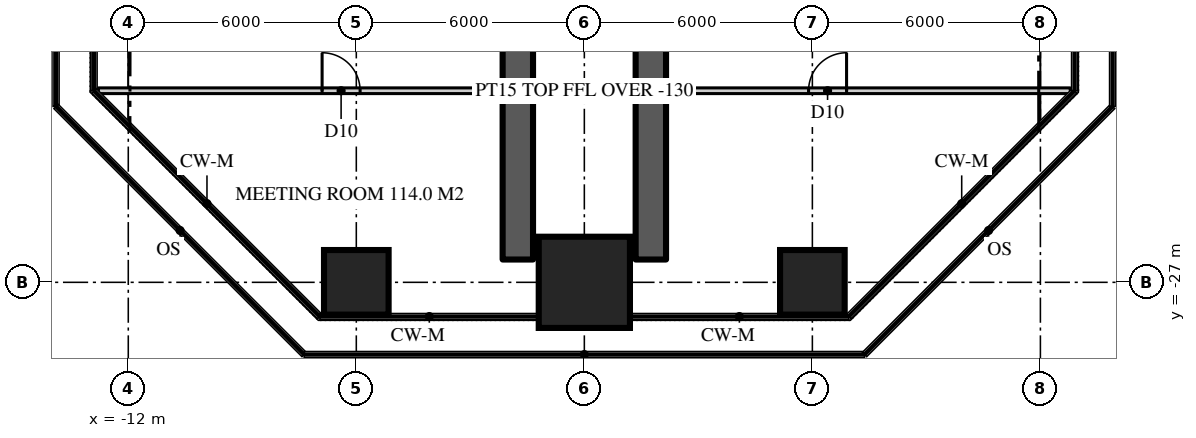
"""IFC4 building model, lengths in metres.
Left out: names, types, materials, properties, quantities, classifications, styles, units other than length and angle.
Written with IfcOpenShell. Run it as: python <this file> out.ifc"""

import sys

from ifc_helpers import new_model, si_unit, direction, frame, frame_2d, origin, origin_2d, place, context, subcontext, project, spatial, rectangle, extrude, element, fill, save


model = new_model("IFC4")
c1 = context("Model", 3, precision=1e-05, world=origin(), true_north=direction((0.0, 1.0)))
c2 = subcontext(c1, "Body", "Model", "MODEL_VIEW")
j1 = project(units=[si_unit("LENGTHUNIT", "METRE"), si_unit("PLANEANGLEUNIT", "RADIAN")], contexts=[c1])
p1 = place(None, origin())
s1 = spatial("IfcSite", under=j1, at=p1, CompositionType="ELEMENT")
p2 = place(p1, origin())
s2 = spatial("IfcBuilding", under=s1, at=p2, CompositionType="ELEMENT")
p3 = place(p2, frame((0.0, 0.0, 190.5)))
s3 = spatial("IfcBuildingStorey", under=s2, at=p3, CompositionType="ELEMENT", Elevation=190.5)
for number, where, z_axis, x_axis in (
    (1, (-1.75, -11.15, 0.0), (0.0, 0.0, 1.0), (0.0, -1.0, 0.0)),
    (2, (1.75, -11.15, 0.0), (0.0, 0.0, 1.0), (0.0, -1.0, 0.0)),
):
    element("IfcWall", number, at=place(p3, frame(where, z_axis=z_axis, x_axis=x_axis)), inside=s3, PredefinedType="SHEAR", context=c2, shape_type="SweptSolid", body=[
        extrude(rectangle(XDim=15.25, YDim=0.8, at=frame_2d((7.625, 0.0))), origin(), (0.0, 0.0, 1.0), 3.9),
    ])
p4 = place(p3, frame((-6.0, -27.0, 0.0), z_axis=(0.0, 0.0, 1.0), x_axis=(1.0, 0.0, 0.0)))
e3 = element("IfcColumn", 3, at=p4, inside=s3, PredefinedType="COLUMN", context=c2, shape_type="SweptSolid", body=[
    extrude(rectangle(XDim=1.7, YDim=1.7, at=origin_2d()), origin(), (0.0, 0.0, 1.0), 3.9),
])
p5 = place(p3, frame((0.0, -27.0, 0.0), z_axis=(0.0, 0.0, 1.0), x_axis=(1.0, 0.0, 0.0)))
e4 = element("IfcColumn", 4, at=p5, inside=s3, PredefinedType="COLUMN", context=c2, shape_type="SweptSolid", body=[
    extrude(rectangle(XDim=2.4, YDim=2.4, at=origin_2d()), origin(), (0.0, 0.0, 1.0), 3.9),
])
p6 = place(p3, frame((6.0, -27.0, 0.0), z_axis=(0.0, 0.0, 1.0), x_axis=(1.0, 0.0, 0.0)))
e5 = element("IfcColumn", 5, at=p6, inside=s3, PredefinedType="COLUMN", context=c2, shape_type="SweptSolid", body=[
    extrude(rectangle(XDim=1.7, YDim=1.7, at=origin_2d()), origin(), (0.0, 0.0, 1.0), 3.9),
])
p7 = place(p3, frame((-12.786, -21.959, 0.0), z_axis=(0.0, 0.0, 1.0), x_axis=(1.0, 0.0, 0.0)))
e6 = element("IfcWall", 6, at=p7, inside=s3, PredefinedType="PARTITIONING", context=c2, shape_type="SweptSolid", body=[
    extrude(rectangle(XDim=25.573, YDim=0.15, at=frame_2d((12.786, 0.0))), origin(), (0.0, 0.0, 1.0), 3.77),
])
p8 = place(p7, frame((18.687, 0.0, 0.0)))
e7 = element("IfcOpeningElement", 7, at=p8, cuts=e6, PredefinedType="OPENING", context=c2, shape_type="SweptSolid", body=[
    extrude(rectangle(XDim=1.0, YDim=2.2, at=frame_2d((0.5, 1.1))), frame((0.0, 0.085, 0.0), z_axis=(0.0, -1.0, 0.0), x_axis=(1.0, 0.0, 0.0)), (0.0, 0.0, 1.0), 0.17),
])
p9 = place(p7, frame((5.886, 0.0, 0.0)))
e8 = element("IfcOpeningElement", 8, at=p9, cuts=e6, PredefinedType="OPENING", context=c2, shape_type="SweptSolid", body=[
    extrude(rectangle(XDim=1.0, YDim=2.2, at=frame_2d((0.5, 1.1))), frame((0.0, 0.085, 0.0), z_axis=(0.0, -1.0, 0.0), x_axis=(1.0, 0.0, 0.0)), (0.0, 0.0, 1.0), 0.17),
])
p10 = place(p8, origin())
e9 = element("IfcDoor", 9, at=p10, inside=s3, OperationType="SINGLE_SWING_RIGHT", PredefinedType="DOOR", context=c2, shape_type="SweptSolid", body=[
    extrude(rectangle(XDim=1.0, YDim=2.2, at=frame_2d((0.5, 1.1))), frame((0.0, 0.025, 0.0), z_axis=(0.0, -1.0, 0.0), x_axis=(1.0, 0.0, 0.0)), (0.0, 0.0, 1.0), 0.05),
])
fill(e7, e9)
p11 = place(p9, origin())
e10 = element("IfcDoor", 10, at=p11, inside=s3, OperationType="SINGLE_SWING_LEFT", PredefinedType="DOOR", context=c2, shape_type="SweptSolid", body=[
    extrude(rectangle(XDim=1.0, YDim=2.2, at=frame_2d((0.5, 1.1))), frame((0.0, 0.025, 0.0), z_axis=(0.0, -1.0, 0.0), x_axis=(1.0, 0.0, 0.0)), (0.0, 0.0, 1.0), 0.05),
])
fill(e8, e10)
save(model, sys.argv[1])
